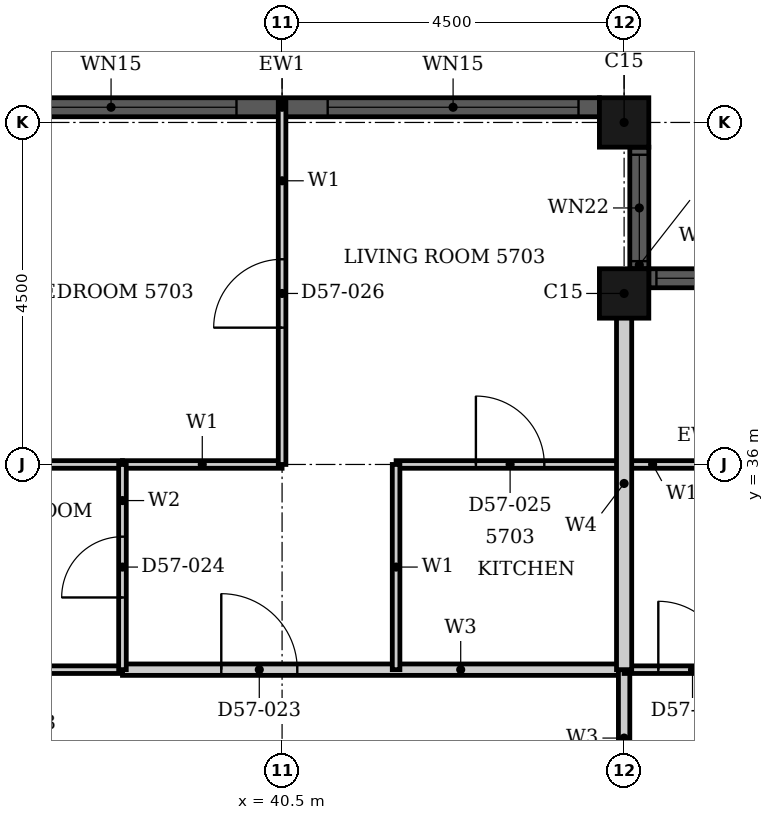
"""IFC4 building model, lengths in metres.
Left out: names, types, materials, properties, quantities, classifications, styles, units other than length and angle.
Written with IfcOpenShell. Run it as: python <this file> out.ifc"""

import sys

from ifc_helpers import new_model, si_unit, direction, frame, frame_2d, origin, origin_2d, place, context, subcontext, project, spatial, rectangle, hollow_rectangle, extrude, element, fill, save


model = new_model("IFC4")
c1 = context("Model", 3, precision=1e-05, world=origin(), true_north=direction((0.0, 1.0)))
c2 = subcontext(c1, "Body", "Model", "MODEL_VIEW")
j1 = project(units=[si_unit("LENGTHUNIT", "METRE"), si_unit("PLANEANGLEUNIT", "RADIAN")], contexts=[c1])
p1 = place(None, origin())
s1 = spatial("IfcSite", under=j1, at=p1, CompositionType="ELEMENT")
p2 = place(p1, origin())
s2 = spatial("IfcBuilding", under=s1, at=p2, CompositionType="ELEMENT")
p3 = place(p2, frame((0.0, 0.0, 225.7)))
s3 = spatial("IfcBuildingStorey", under=s2, at=p3, CompositionType="ELEMENT", Elevation=225.7)
for number, where, z_axis, x_axis in (
    (1, (45.0, 38.25, 0.0), (0.0, 0.0, 1.0), (1.0, 0.0, 0.0)),
    (2, (45.0, 40.5, 0.0), (0.0, 0.0, 1.0), (1.0, 0.0, 0.0)),
):
    element("IfcColumn", number, at=place(p3, frame(where, z_axis=z_axis, x_axis=x_axis)), inside=s3, PredefinedType="COLUMN", context=c2, shape_type="SweptSolid", body=[
        extrude(hollow_rectangle(XDim=0.65, YDim=0.65, WallThickness=0.021, at=origin_2d()), origin(), (0.0, 0.0, 1.0), 3.7),
    ])
p4 = place(p3, frame((46.925, 38.45, 0.0), z_axis=(0.0, 0.0, 1.0), x_axis=(-1.0, 0.0, 0.0)))
e3 = element("IfcWall", 3, at=p4, inside=s3, PredefinedType="SOLIDWALL", context=c2, shape_type="SweptSolid", body=[
    extrude(rectangle(XDim=1.6, YDim=0.25, at=frame_2d((0.8, 0.0))), origin(), (0.0, 0.0, 1.0), 3.7),
])
p5 = place(p4, frame((0.1, 0.0, 0.9)))
e4 = element("IfcOpeningElement", 4, at=p5, cuts=e3, PredefinedType="OPENING", context=c2, shape_type="SweptSolid", body=[
    extrude(rectangle(XDim=1.4, YDim=1.85, at=frame_2d((0.7, 0.925))), frame((0.0, 0.135, 0.0), z_axis=(0.0, -1.0, 0.0), x_axis=(1.0, 0.0, 0.0)), (0.0, 0.0, 1.0), 0.27),
])
p6 = place(p3, frame((45.2, 38.575, 0.0), z_axis=(0.0, 0.0, 1.0), x_axis=(0.0, 1.0, 0.0)))
e5 = element("IfcWall", 5, at=p6, inside=s3, PredefinedType="SOLIDWALL", context=c2, shape_type="SweptSolid", body=[
    extrude(rectangle(XDim=1.6, YDim=0.25, at=frame_2d((0.8, 0.0))), origin(), (0.0, 0.0, 1.0), 3.7),
])
p7 = place(p6, frame((0.1, 0.0, 0.9)))
e6 = element("IfcOpeningElement", 6, at=p7, cuts=e5, PredefinedType="OPENING", context=c2, shape_type="SweptSolid", body=[
    extrude(rectangle(XDim=1.4, YDim=1.85, at=frame_2d((0.7, 0.925))), frame((0.0, 0.135, 0.0), z_axis=(0.0, -1.0, 0.0), x_axis=(1.0, 0.0, 0.0)), (0.0, 0.0, 1.0), 0.27),
])
p8 = place(p3, frame((44.675, 40.7, 0.0), z_axis=(0.0, 0.0, 1.0), x_axis=(-1.0, 0.0, 0.0)))
e7 = element("IfcWall", 7, at=p8, inside=s3, PredefinedType="SOLIDWALL", context=c2, shape_type="SweptSolid", body=[
    extrude(rectangle(XDim=8.35, YDim=0.25, at=frame_2d((4.175, 0.0))), origin(), (0.0, 0.0, 1.0), 3.7),
])
p9 = place(p8, frame((0.275, 0.0, 0.45)))
e8 = element("IfcOpeningElement", 8, at=p9, cuts=e7, PredefinedType="OPENING", context=c2, shape_type="SweptSolid", body=[
    extrude(rectangle(XDim=3.3, YDim=2.3, at=frame_2d((1.65, 1.15))), frame((0.0, 0.135, 0.0), z_axis=(0.0, -1.0, 0.0), x_axis=(1.0, 0.0, 0.0)), (0.0, 0.0, 1.0), 0.27),
])
p10 = place(p8, frame((4.775, 0.0, 0.45)))
e9 = element("IfcOpeningElement", 9, at=p10, cuts=e7, PredefinedType="OPENING", context=c2, shape_type="SweptSolid", body=[
    extrude(rectangle(XDim=3.3, YDim=2.3, at=frame_2d((1.65, 1.15))), frame((0.0, 0.135, 0.0), z_axis=(0.0, -1.0, 0.0), x_axis=(1.0, 0.0, 0.0)), (0.0, 0.0, 1.0), 0.27),
])
p11 = place(p3, frame((38.4, 33.3, 0.0), z_axis=(0.0, 0.0, 1.0), x_axis=(1.0, 0.0, 0.0)))
e10 = element("IfcWall", 10, at=p11, inside=s3, PredefinedType="PARTITIONING", context=c2, shape_type="SweptSolid", body=[
    extrude(rectangle(XDim=6.6, YDim=0.15, at=frame_2d((3.3, 0.0))), origin(), (0.0, 0.0, 1.0), 3.4),
])
p12 = place(p11, frame((1.3, 0.0, 0.0)))
e11 = element("IfcOpeningElement", 11, at=p12, cuts=e10, PredefinedType="OPENING", context=c2, shape_type="SweptSolid", body=[
    extrude(rectangle(XDim=1.0, YDim=2.2, at=frame_2d((0.5, 1.1))), frame((0.0, 0.085, 0.0), z_axis=(0.0, -1.0, 0.0), x_axis=(1.0, 0.0, 0.0)), (0.0, 0.0, 1.0), 0.17),
])
p13 = place(p3, frame((45.0, 31.5, 0.0), z_axis=(0.0, 0.0, 1.0), x_axis=(0.0, 1.0, 0.0)))
e12 = element("IfcWall", 12, at=p13, inside=s3, PredefinedType="PARTITIONING", context=c2, shape_type="SweptSolid", body=[
    extrude(rectangle(XDim=1.8, YDim=0.15, at=frame_2d((0.9, 0.0))), origin(), (0.0, 0.0, 1.0), 3.4),
])
p14 = place(p3, frame((45.0, 33.3, 0.0), z_axis=(0.0, 0.0, 1.0), x_axis=(1.0, 0.0, 0.0)))
e13 = element("IfcWall", 13, at=p14, inside=s3, PredefinedType="PARTITIONING", context=c2, shape_type="SweptSolid", body=[
    extrude(rectangle(XDim=1.8, YDim=0.1, at=frame_2d((0.9, 0.0))), origin(), (0.0, 0.0, 1.0), 3.4),
])
p15 = place(p14, frame((0.45, 0.0, 0.0)))
e14 = element("IfcOpeningElement", 14, at=p15, cuts=e13, PredefinedType="OPENING", context=c2, shape_type="SweptSolid", body=[
    extrude(rectangle(XDim=0.9, YDim=2.1, at=frame_2d((0.45, 1.05))), frame((0.0, 0.06, 0.0), z_axis=(0.0, -1.0, 0.0), x_axis=(1.0, 0.0, 0.0)), (0.0, 0.0, 1.0), 0.12),
])
p16 = place(p3, frame((38.4, 36.0, 0.0), z_axis=(0.0, 0.0, 1.0), x_axis=(1.0, 0.0, 0.0)))
e15 = element("IfcWall", 15, at=p16, inside=s3, PredefinedType="PARTITIONING", context=c2, shape_type="SweptSolid", body=[
    extrude(rectangle(XDim=2.1, YDim=0.1, at=frame_2d((1.05, 0.0))), origin(), (0.0, 0.0, 1.0), 3.4),
])
p17 = place(p3, frame((42.0, 36.0, 0.0), z_axis=(0.0, 0.0, 1.0), x_axis=(1.0, 0.0, 0.0)))
e16 = element("IfcWall", 16, at=p17, inside=s3, PredefinedType="PARTITIONING", context=c2, shape_type="SweptSolid", body=[
    extrude(rectangle(XDim=4.8, YDim=0.1, at=frame_2d((2.4, 0.0))), origin(), (0.0, 0.0, 1.0), 3.4),
])
p18 = place(p17, frame((1.05, 0.0, 0.0)))
e17 = element("IfcOpeningElement", 17, at=p18, cuts=e16, PredefinedType="OPENING", context=c2, shape_type="SweptSolid", body=[
    extrude(rectangle(XDim=0.9, YDim=2.1, at=frame_2d((0.45, 1.05))), frame((0.0, 0.06, 0.0), z_axis=(0.0, -1.0, 0.0), x_axis=(1.0, 0.0, 0.0)), (0.0, 0.0, 1.0), 0.12),
])
p19 = place(p3, frame((40.5, 36.0, 0.0), z_axis=(0.0, 0.0, 1.0), x_axis=(0.0, 1.0, 0.0)))
e18 = element("IfcWall", 18, at=p19, inside=s3, PredefinedType="PARTITIONING", context=c2, shape_type="SweptSolid", body=[
    extrude(rectangle(XDim=4.765, YDim=0.1, at=frame_2d((2.382, 0.0))), origin(), (0.0, 0.0, 1.0), 3.4),
])
p20 = place(p19, frame((1.8, 0.0, 0.0)))
e19 = element("IfcOpeningElement", 19, at=p20, cuts=e18, PredefinedType="OPENING", context=c2, shape_type="SweptSolid", body=[
    extrude(rectangle(XDim=0.9, YDim=2.1, at=frame_2d((0.45, 1.05))), frame((0.0, 0.06, 0.0), z_axis=(0.0, -1.0, 0.0), x_axis=(1.0, 0.0, 0.0)), (0.0, 0.0, 1.0), 0.12),
])
p21 = place(p3, frame((42.0, 33.3, 0.0), z_axis=(0.0, 0.0, 1.0), x_axis=(0.0, 1.0, 0.0)))
e20 = element("IfcWall", 20, at=p21, inside=s3, PredefinedType="PARTITIONING", context=c2, shape_type="SweptSolid", body=[
    extrude(rectangle(XDim=2.7, YDim=0.1, at=frame_2d((1.35, 0.0))), origin(), (0.0, 0.0, 1.0), 3.4),
])
p22 = place(p3, frame((45.0, 33.3, 0.0), z_axis=(0.0, 0.0, 1.0), x_axis=(0.0, 1.0, 0.0)))
e21 = element("IfcWall", 21, at=p22, inside=s3, PredefinedType="PARTITIONING", context=c2, shape_type="SweptSolid", body=[
    extrude(rectangle(XDim=4.9, YDim=0.2, at=frame_2d((2.45, 0.0))), origin(), (0.0, 0.0, 1.0), 3.4),
])
for number, where, z_axis, x_axis in (
    (22, (36.0, 33.3, 0.0), (0.0, 0.0, 1.0), (1.0, 0.0, 0.0)),
    (23, (36.0, 36.0, 0.0), (0.0, 0.0, 1.0), (1.0, 0.0, 0.0)),
):
    element("IfcWall", number, at=place(p3, frame(where, z_axis=z_axis, x_axis=x_axis)), inside=s3, PredefinedType="PARTITIONING", context=c2, shape_type="SweptSolid", body=[
        extrude(rectangle(XDim=2.4, YDim=0.1, at=frame_2d((1.2, 0.0))), origin(), (0.0, 0.0, 1.0), 3.4),
    ])
p23 = place(p3, frame((38.4, 33.3, 0.0), z_axis=(0.0, 0.0, 1.0), x_axis=(0.0, 1.0, 0.0)))
e24 = element("IfcWall", 24, at=p23, inside=s3, PredefinedType="PARTITIONING", context=c2, shape_type="SweptSolid", body=[
    extrude(rectangle(XDim=2.7, YDim=0.1, at=frame_2d((1.35, 0.0))), origin(), (0.0, 0.0, 1.0), 3.4),
])
p24 = place(p23, frame((0.95, 0.0, 0.0)))
e25 = element("IfcOpeningElement", 25, at=p24, cuts=e24, PredefinedType="OPENING", context=c2, shape_type="SweptSolid", body=[
    extrude(rectangle(XDim=0.8, YDim=2.1, at=frame_2d((0.4, 1.05))), frame((0.0, 0.06, 0.0), z_axis=(0.0, -1.0, 0.0), x_axis=(1.0, 0.0, 0.0)), (0.0, 0.0, 1.0), 0.12),
])
p25 = place(p5, origin())
e26 = element("IfcWindow", 26, at=p25, inside=s3, PartitioningType="SINGLE_PANEL", PredefinedType="WINDOW", context=c2, shape_type="SweptSolid", body=[
    extrude(rectangle(XDim=1.4, YDim=1.85, at=frame_2d((0.7, 0.925))), frame((0.0, 0.03, 0.0), z_axis=(0.0, -1.0, 0.0), x_axis=(1.0, 0.0, 0.0)), (0.0, 0.0, 1.0), 0.06),
])
fill(e4, e26)
p26 = place(p7, origin())
e27 = element("IfcWindow", 27, at=p26, inside=s3, PartitioningType="SINGLE_PANEL", PredefinedType="WINDOW", context=c2, shape_type="SweptSolid", body=[
    extrude(rectangle(XDim=1.4, YDim=1.85, at=frame_2d((0.7, 0.925))), frame((0.0, 0.03, 0.0), z_axis=(0.0, -1.0, 0.0), x_axis=(1.0, 0.0, 0.0)), (0.0, 0.0, 1.0), 0.06),
])
fill(e6, e27)
p27 = place(p9, origin())
e28 = element("IfcWindow", 28, at=p27, inside=s3, PartitioningType="SINGLE_PANEL", PredefinedType="WINDOW", context=c2, shape_type="SweptSolid", body=[
    extrude(rectangle(XDim=3.3, YDim=2.3, at=frame_2d((1.65, 1.15))), frame((0.0, 0.03, 0.0), z_axis=(0.0, -1.0, 0.0), x_axis=(1.0, 0.0, 0.0)), (0.0, 0.0, 1.0), 0.06),
])
fill(e8, e28)
p28 = place(p10, origin())
e29 = element("IfcWindow", 29, at=p28, inside=s3, PartitioningType="SINGLE_PANEL", PredefinedType="WINDOW", context=c2, shape_type="SweptSolid", body=[
    extrude(rectangle(XDim=3.3, YDim=2.3, at=frame_2d((1.65, 1.15))), frame((0.0, 0.03, 0.0), z_axis=(0.0, -1.0, 0.0), x_axis=(1.0, 0.0, 0.0)), (0.0, 0.0, 1.0), 0.06),
])
fill(e9, e29)
p29 = place(p12, origin())
e30 = element("IfcDoor", 30, at=p29, inside=s3, OperationType="SINGLE_SWING_RIGHT", PredefinedType="DOOR", context=c2, shape_type="SweptSolid", body=[
    extrude(rectangle(XDim=1.0, YDim=2.2, at=frame_2d((0.5, 1.1))), frame((0.0, 0.025, 0.0), z_axis=(0.0, -1.0, 0.0), x_axis=(1.0, 0.0, 0.0)), (0.0, 0.0, 1.0), 0.05),
])
fill(e11, e30)
p30 = place(p24, origin())
e31 = element("IfcDoor", 31, at=p30, inside=s3, OperationType="SINGLE_SWING_LEFT", PredefinedType="DOOR", context=c2, shape_type="SweptSolid", body=[
    extrude(rectangle(XDim=0.8, YDim=2.1, at=frame_2d((0.4, 1.05))), frame((0.0, 0.025, 0.0), z_axis=(0.0, -1.0, 0.0), x_axis=(1.0, 0.0, 0.0)), (0.0, 0.0, 1.0), 0.05),
])
fill(e25, e31)
p31 = place(p18, origin())
e32 = element("IfcDoor", 32, at=p31, inside=s3, OperationType="SINGLE_SWING_RIGHT", PredefinedType="DOOR", context=c2, shape_type="SweptSolid", body=[
    extrude(rectangle(XDim=0.9, YDim=2.1, at=frame_2d((0.45, 1.05))), frame((0.0, 0.025, 0.0), z_axis=(0.0, -1.0, 0.0), x_axis=(1.0, 0.0, 0.0)), (0.0, 0.0, 1.0), 0.05),
])
fill(e17, e32)
p32 = place(p20, origin())
e33 = element("IfcDoor", 33, at=p32, inside=s3, OperationType="SINGLE_SWING_RIGHT", PredefinedType="DOOR", context=c2, shape_type="SweptSolid", body=[
    extrude(rectangle(XDim=0.9, YDim=2.1, at=frame_2d((0.45, 1.05))), frame((0.0, 0.025, 0.0), z_axis=(0.0, -1.0, 0.0), x_axis=(1.0, 0.0, 0.0)), (0.0, 0.0, 1.0), 0.05),
])
fill(e19, e33)
p33 = place(p15, origin())
e34 = element("IfcDoor", 34, at=p33, inside=s3, OperationType="SINGLE_SWING_LEFT", PredefinedType="DOOR", context=c2, shape_type="SweptSolid", body=[
    extrude(rectangle(XDim=0.9, YDim=2.1, at=frame_2d((0.45, 1.05))), frame((0.0, 0.025, 0.0), z_axis=(0.0, -1.0, 0.0), x_axis=(1.0, 0.0, 0.0)), (0.0, 0.0, 1.0), 0.05),
])
fill(e14, e34)
save(model, sys.argv[1])
